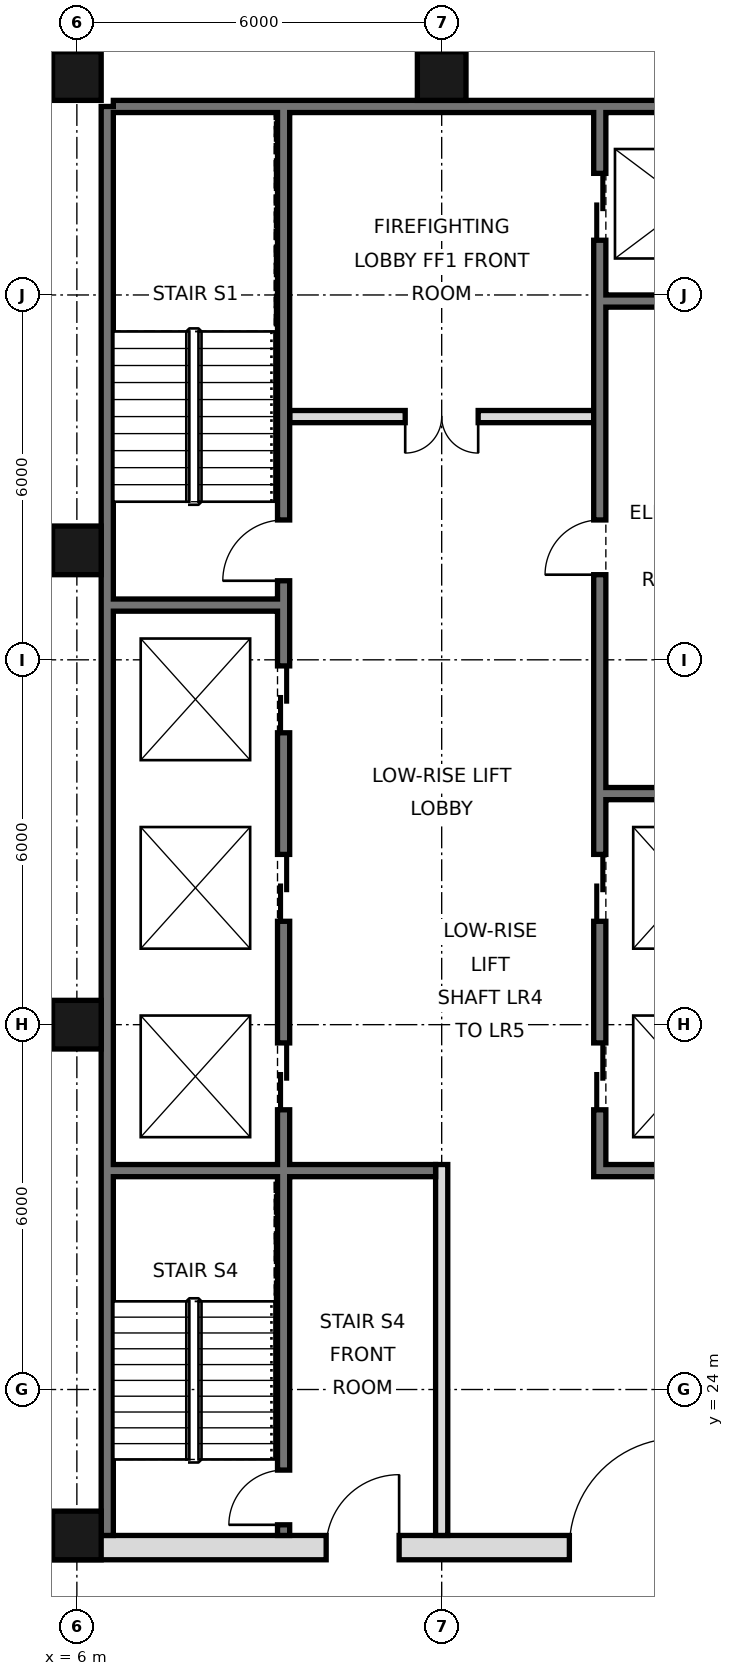
"""IFC4 building model, lengths in metres.
Left out: names, types, materials, properties, quantities, classifications, styles, units other than length and angle.
Written with IfcOpenShell. Run it as: python <this file> out.ifc"""

import sys

from ifc_helpers import new_model, si_unit, direction, frame, frame_2d, origin, origin_2d, place, context, subcontext, project, spatial, rectangle, hollow_rectangle, extrude, element, fill, save


model = new_model("IFC4")
c1 = context("Model", 3, precision=1e-05, world=origin(), true_north=direction((0.0, 1.0)))
c2 = subcontext(c1, "Body", "Model", "MODEL_VIEW")
j1 = project(units=[si_unit("LENGTHUNIT", "METRE"), si_unit("PLANEANGLEUNIT", "RADIAN")], contexts=[c1])
p1 = place(None, origin())
s1 = spatial("IfcSite", under=j1, at=p1, CompositionType="ELEMENT")
p2 = place(p1, origin())
s2 = spatial("IfcBuilding", under=s1, at=p2, CompositionType="ELEMENT")
p3 = place(p2, frame((0.0, 0.0, 151.0)))
s3 = spatial("IfcBuildingStorey", under=s2, at=p3, CompositionType="ELEMENT", Elevation=151.0)
for number, where, z_axis, x_axis in (
    (1, (6.0, 21.6, 0.0), (0.0, 0.0, 1.0), (1.0, 0.0, 0.0)),
    (2, (6.0, 30.0, 0.0), (0.0, 0.0, 1.0), (1.0, 0.0, 0.0)),
    (3, (6.0, 37.8, 0.0), (0.0, 0.0, 1.0), (1.0, 0.0, 0.0)),
    (4, (6.0, 45.6, 0.0), (0.0, 0.0, 1.0), (1.0, 0.0, 0.0)),
    (5, (12.0, 45.6, 0.0), (0.0, 0.0, 1.0), (1.0, 0.0, 0.0)),
):
    element("IfcColumn", number, at=place(p3, frame(where, z_axis=z_axis, x_axis=x_axis)), inside=s3, PredefinedType="COLUMN", context=c2, shape_type="SweptSolid", body=[
        extrude(hollow_rectangle(XDim=0.8, YDim=0.8, WallThickness=0.045, at=origin_2d()), origin(), (0.0, 0.0, 1.0), 3.6),
    ])
p4 = place(p3, frame((6.5, 21.6, 0.0), z_axis=(0.0, 0.0, 1.0), x_axis=(0.0, 1.0, 0.0)))
e6 = element("IfcWall", 6, at=p4, inside=s3, PredefinedType="SOLIDWALL", context=c2, shape_type="SweptSolid", body=[
    extrude(rectangle(XDim=23.5, YDim=0.2, at=frame_2d((11.75, 0.0))), origin(), (0.0, 0.0, 1.0), 3.42),
])
p5 = place(p3, frame((6.6, 45.1, 0.0), z_axis=(0.0, 0.0, 1.0), x_axis=(1.0, 0.0, 0.0)))
e7 = element("IfcWall", 7, at=p5, inside=s3, PredefinedType="SOLIDWALL", context=c2, shape_type="SweptSolid", body=[
    extrude(rectangle(XDim=34.8, YDim=0.2, at=frame_2d((17.4, 0.0))), origin(), (0.0, 0.0, 1.0), 3.42),
])
p6 = place(p3, frame((5.6, 21.4, 0.0), z_axis=(0.0, 0.0, 1.0), x_axis=(1.0, 0.0, 0.0)))
e8 = element("IfcWall", 8, at=p6, inside=s3, PredefinedType="SOLIDWALL", context=c2, shape_type="SweptSolid", body=[
    extrude(rectangle(XDim=36.8, YDim=0.4, at=frame_2d((18.4, 0.0))), origin(), (0.0, 0.0, 1.0), 3.42),
])
p7 = place(p6, frame((8.5, 0.0, 0.0)))
e9 = element("IfcOpeningElement", 9, at=p7, cuts=e8, PredefinedType="OPENING", context=c2, shape_type="SweptSolid", body=[
    extrude(rectangle(XDim=1.8, YDim=2.1, at=frame_2d((0.9, 1.05))), frame((0.0, 0.21, 0.0), z_axis=(0.0, -1.0, 0.0), x_axis=(1.0, 0.0, 0.0)), (0.0, 0.0, 1.0), 0.42),
])
p8 = place(p6, frame((17.5, 0.0, 0.0)))
e10 = element("IfcOpeningElement", 10, at=p8, cuts=e8, PredefinedType="OPENING", context=c2, shape_type="SweptSolid", body=[
    extrude(rectangle(XDim=1.8, YDim=2.1, at=frame_2d((0.9, 1.05))), frame((0.0, 0.21, 0.0), z_axis=(0.0, -1.0, 0.0), x_axis=(1.0, 0.0, 0.0)), (0.0, 0.0, 1.0), 0.42),
])
p9 = place(p6, frame((26.5, 0.0, 0.0)))
e11 = element("IfcOpeningElement", 11, at=p9, cuts=e8, PredefinedType="OPENING", context=c2, shape_type="SweptSolid", body=[
    extrude(rectangle(XDim=1.8, YDim=2.1, at=frame_2d((0.9, 1.05))), frame((0.0, 0.21, 0.0), z_axis=(0.0, -1.0, 0.0), x_axis=(1.0, 0.0, 0.0)), (0.0, 0.0, 1.0), 0.42),
])
p10 = place(p6, frame((4.5, 0.0, 0.0)))
e12 = element("IfcOpeningElement", 12, at=p10, cuts=e8, PredefinedType="OPENING", context=c2, shape_type="SweptSolid", body=[
    extrude(rectangle(XDim=1.2, YDim=2.1, at=frame_2d((0.6, 1.05))), frame((0.0, 0.21, 0.0), z_axis=(0.0, -1.0, 0.0), x_axis=(1.0, 0.0, 0.0)), (0.0, 0.0, 1.0), 0.42),
])
p11 = place(p6, frame((31.1, 0.0, 0.0)))
e13 = element("IfcOpeningElement", 13, at=p11, cuts=e8, PredefinedType="OPENING", context=c2, shape_type="SweptSolid", body=[
    extrude(rectangle(XDim=1.2, YDim=2.1, at=frame_2d((0.6, 1.05))), frame((0.0, 0.21, 0.0), z_axis=(0.0, -1.0, 0.0), x_axis=(1.0, 0.0, 0.0)), (0.0, 0.0, 1.0), 0.42),
])
p12 = place(p3, frame((12.0, 21.6, 0.0), z_axis=(0.0, 0.0, 1.0), x_axis=(0.0, 1.0, 0.0)))
e14 = element("IfcWall", 14, at=p12, inside=s3, PredefinedType="PARTITIONING", context=c2, shape_type="SweptSolid", body=[
    extrude(rectangle(XDim=6.1, YDim=0.2, at=frame_2d((3.05, 0.0))), origin(), (0.0, 0.0, 1.0), 3.42),
])
p13 = place(p3, frame((14.6, 27.5, 0.0), z_axis=(0.0, 0.0, 1.0), x_axis=(0.0, 1.0, 0.0)))
e15 = element("IfcWall", 15, at=p13, inside=s3, PredefinedType="SOLIDWALL", context=c2, shape_type="SweptSolid", body=[
    extrude(rectangle(XDim=17.5, YDim=0.2, at=frame_2d((8.75, 0.0))), origin(), (0.0, 0.0, 1.0), 3.42),
])
p14 = place(p13, frame((1.1, 0.0, 0.0)))
e16 = element("IfcOpeningElement", 16, at=p14, cuts=e15, PredefinedType="OPENING", context=c2, shape_type="SweptSolid", body=[
    extrude(rectangle(XDim=1.1, YDim=2.1, at=frame_2d((0.55, 1.05))), frame((0.0, 0.11, 0.0), z_axis=(0.0, -1.0, 0.0), x_axis=(1.0, 0.0, 0.0)), (0.0, 0.0, 1.0), 0.22),
])
p15 = place(p13, frame((4.2, 0.0, 0.0)))
e17 = element("IfcOpeningElement", 17, at=p15, cuts=e15, PredefinedType="OPENING", context=c2, shape_type="SweptSolid", body=[
    extrude(rectangle(XDim=1.1, YDim=2.1, at=frame_2d((0.55, 1.05))), frame((0.0, 0.11, 0.0), z_axis=(0.0, -1.0, 0.0), x_axis=(1.0, 0.0, 0.0)), (0.0, 0.0, 1.0), 0.22),
])
p16 = place(p13, frame((15.4, 0.0, 0.0)))
e18 = element("IfcOpeningElement", 18, at=p16, cuts=e15, PredefinedType="OPENING", context=c2, shape_type="SweptSolid", body=[
    extrude(rectangle(XDim=1.1, YDim=2.1, at=frame_2d((0.55, 1.05))), frame((0.0, 0.11, 0.0), z_axis=(0.0, -1.0, 0.0), x_axis=(1.0, 0.0, 0.0)), (0.0, 0.0, 1.0), 0.22),
])
p17 = place(p13, frame((9.9, 0.0, 0.0)))
e19 = element("IfcOpeningElement", 19, at=p17, cuts=e15, PredefinedType="OPENING", context=c2, shape_type="SweptSolid", body=[
    extrude(rectangle(XDim=0.9, YDim=2.1, at=frame_2d((0.45, 1.05))), frame((0.0, 0.11, 0.0), z_axis=(0.0, -1.0, 0.0), x_axis=(1.0, 0.0, 0.0)), (0.0, 0.0, 1.0), 0.22),
])
p18 = place(p3, frame((9.4, 21.6, 0.0), z_axis=(0.0, 0.0, 1.0), x_axis=(0.0, 1.0, 0.0)))
e20 = element("IfcWall", 20, at=p18, inside=s3, PredefinedType="SOLIDWALL", context=c2, shape_type="SweptSolid", body=[
    extrude(rectangle(XDim=23.4, YDim=0.2, at=frame_2d((11.7, 0.0))), origin(), (0.0, 0.0, 1.0), 3.42),
])
p19 = place(p18, frame((7.0, 0.0, 0.0)))
e21 = element("IfcOpeningElement", 21, at=p19, cuts=e20, PredefinedType="OPENING", context=c2, shape_type="SweptSolid", body=[
    extrude(rectangle(XDim=1.1, YDim=2.1, at=frame_2d((0.55, 1.05))), frame((0.0, 0.11, 0.0), z_axis=(0.0, -1.0, 0.0), x_axis=(1.0, 0.0, 0.0)), (0.0, 0.0, 1.0), 0.22),
])
p20 = place(p18, frame((10.1, 0.0, 0.0)))
e22 = element("IfcOpeningElement", 22, at=p20, cuts=e20, PredefinedType="OPENING", context=c2, shape_type="SweptSolid", body=[
    extrude(rectangle(XDim=1.1, YDim=2.1, at=frame_2d((0.55, 1.05))), frame((0.0, 0.11, 0.0), z_axis=(0.0, -1.0, 0.0), x_axis=(1.0, 0.0, 0.0)), (0.0, 0.0, 1.0), 0.22),
])
p21 = place(p18, frame((13.2, 0.0, 0.0)))
e23 = element("IfcOpeningElement", 23, at=p21, cuts=e20, PredefinedType="OPENING", context=c2, shape_type="SweptSolid", body=[
    extrude(rectangle(XDim=1.1, YDim=2.1, at=frame_2d((0.55, 1.05))), frame((0.0, 0.11, 0.0), z_axis=(0.0, -1.0, 0.0), x_axis=(1.0, 0.0, 0.0)), (0.0, 0.0, 1.0), 0.22),
])
p22 = place(p18, frame((15.7, 0.0, 0.0)))
e24 = element("IfcOpeningElement", 24, at=p22, cuts=e20, PredefinedType="OPENING", context=c2, shape_type="SweptSolid", body=[
    extrude(rectangle(XDim=1.0, YDim=2.1, at=frame_2d((0.5, 1.05))), frame((0.0, 0.11, 0.0), z_axis=(0.0, -1.0, 0.0), x_axis=(1.0, 0.0, 0.0)), (0.0, 0.0, 1.0), 0.22),
])
p23 = place(p18, frame((0.175, 0.0, 0.0)))
e25 = element("IfcOpeningElement", 25, at=p23, cuts=e20, PredefinedType="OPENING", context=c2, shape_type="SweptSolid", body=[
    extrude(rectangle(XDim=0.9, YDim=2.1, at=frame_2d((0.45, 1.05))), frame((0.0, 0.11, 0.0), z_axis=(0.0, -1.0, 0.0), x_axis=(1.0, 0.0, 0.0)), (0.0, 0.0, 1.0), 0.22),
])
p24 = place(p3, frame((14.7, 27.6, 0.0), z_axis=(0.0, 0.0, 1.0), x_axis=(1.0, 0.0, 0.0)))
e26 = element("IfcWall", 26, at=p24, inside=s3, PredefinedType="SOLIDWALL", context=c2, shape_type="SweptSolid", body=[
    extrude(rectangle(XDim=2.7, YDim=0.2, at=frame_2d((1.35, 0.0))), origin(), (0.0, 0.0, 1.0), 3.42),
])
p25 = place(p3, frame((6.6, 27.6, 0.0), z_axis=(0.0, 0.0, 1.0), x_axis=(1.0, 0.0, 0.0)))
e27 = element("IfcWall", 27, at=p25, inside=s3, PredefinedType="SOLIDWALL", context=c2, shape_type="SweptSolid", body=[
    extrude(rectangle(XDim=5.3, YDim=0.2, at=frame_2d((2.65, 0.0))), origin(), (0.0, 0.0, 1.0), 3.42),
])
for number, where, z_axis, x_axis in (
    (28, (14.7, 33.8, 0.0), (0.0, 0.0, 1.0), (1.0, 0.0, 0.0)),
    (29, (6.6, 36.9, 0.0), (0.0, 0.0, 1.0), (1.0, 0.0, 0.0)),
):
    element("IfcWall", number, at=place(p3, frame(where, z_axis=z_axis, x_axis=x_axis)), inside=s3, PredefinedType="SOLIDWALL", context=c2, shape_type="SweptSolid", body=[
        extrude(rectangle(XDim=2.7, YDim=0.2, at=frame_2d((1.35, 0.0))), origin(), (0.0, 0.0, 1.0), 3.42),
    ])
p26 = place(p3, frame((9.5, 40.0, 0.0), z_axis=(0.0, 0.0, 1.0), x_axis=(1.0, 0.0, 0.0)))
e30 = element("IfcWall", 30, at=p26, inside=s3, PredefinedType="PARTITIONING", context=c2, shape_type="SweptSolid", body=[
    extrude(rectangle(XDim=5.0, YDim=0.2, at=frame_2d((2.5, 0.0))), origin(), (0.0, 0.0, 1.0), 3.42),
])
p27 = place(p26, frame((1.9, 0.0, 0.0)))
e31 = element("IfcOpeningElement", 31, at=p27, cuts=e30, PredefinedType="OPENING", context=c2, shape_type="SweptSolid", body=[
    extrude(rectangle(XDim=1.2, YDim=2.1, at=frame_2d((0.6, 1.05))), frame((0.0, 0.11, 0.0), z_axis=(0.0, -1.0, 0.0), x_axis=(1.0, 0.0, 0.0)), (0.0, 0.0, 1.0), 0.22),
])
p28 = place(p3, frame((14.7, 41.9, 0.0), z_axis=(0.0, 0.0, 1.0), x_axis=(1.0, 0.0, 0.0)))
e32 = element("IfcWall", 32, at=p28, inside=s3, PredefinedType="SOLIDWALL", context=c2, shape_type="SweptSolid", body=[
    extrude(rectangle(XDim=2.7, YDim=0.2, at=frame_2d((1.35, 0.0))), origin(), (0.0, 0.0, 1.0), 3.42),
])
p29 = place(p7, frame((1.8, 0.0, 0.0), z_axis=(0.0, 0.0, 1.0), x_axis=(-1.0, 0.0, 0.0)))
e33 = element("IfcDoor", 33, at=p29, inside=s3, OperationType="SINGLE_SWING_LEFT", PredefinedType="DOOR", context=c2, shape_type="SweptSolid", body=[
    extrude(rectangle(XDim=1.8, YDim=2.1, at=frame_2d((0.9, 1.05))), frame((0.0, 0.025, 0.0), z_axis=(0.0, -1.0, 0.0), x_axis=(1.0, 0.0, 0.0)), (0.0, 0.0, 1.0), 0.05),
])
fill(e9, e33)
p30 = place(p10, frame((1.2, 0.0, 0.0), z_axis=(0.0, 0.0, 1.0), x_axis=(-1.0, 0.0, 0.0)))
e34 = element("IfcDoor", 34, at=p30, inside=s3, OperationType="SINGLE_SWING_LEFT", PredefinedType="DOOR", context=c2, shape_type="SweptSolid", body=[
    extrude(rectangle(XDim=1.2, YDim=2.1, at=frame_2d((0.6, 1.05))), frame((0.0, 0.025, 0.0), z_axis=(0.0, -1.0, 0.0), x_axis=(1.0, 0.0, 0.0)), (0.0, 0.0, 1.0), 0.05),
])
fill(e12, e34)
p31 = place(p27, frame((1.2, 0.0, 0.0), z_axis=(0.0, 0.0, 1.0), x_axis=(-1.0, 0.0, 0.0)))
e35 = element("IfcDoor", 35, at=p31, inside=s3, OperationType="DOUBLE_DOOR_SINGLE_SWING", PredefinedType="DOOR", context=c2, shape_type="SweptSolid", body=[
    extrude(rectangle(XDim=1.2, YDim=2.1, at=frame_2d((0.6, 1.05))), frame((0.0, 0.025, 0.0), z_axis=(0.0, -1.0, 0.0), x_axis=(1.0, 0.0, 0.0)), (0.0, 0.0, 1.0), 0.05),
])
fill(e31, e35)
p32 = place(p14, origin())
e36 = element("IfcDoor", 36, at=p32, inside=s3, OperationType="DOUBLE_DOOR_SLIDING", PredefinedType="DOOR", context=c2, shape_type="SweptSolid", body=[
    extrude(rectangle(XDim=1.1, YDim=2.1, at=frame_2d((0.55, 1.05))), frame((0.0, 0.025, 0.0), z_axis=(0.0, -1.0, 0.0), x_axis=(1.0, 0.0, 0.0)), (0.0, 0.0, 1.0), 0.05),
])
fill(e16, e36)
p33 = place(p15, origin())
e37 = element("IfcDoor", 37, at=p33, inside=s3, OperationType="DOUBLE_DOOR_SLIDING", PredefinedType="DOOR", context=c2, shape_type="SweptSolid", body=[
    extrude(rectangle(XDim=1.1, YDim=2.1, at=frame_2d((0.55, 1.05))), frame((0.0, 0.025, 0.0), z_axis=(0.0, -1.0, 0.0), x_axis=(1.0, 0.0, 0.0)), (0.0, 0.0, 1.0), 0.05),
])
fill(e17, e37)
p34 = place(p16, origin())
e38 = element("IfcDoor", 38, at=p34, inside=s3, OperationType="DOUBLE_DOOR_SLIDING", PredefinedType="DOOR", context=c2, shape_type="SweptSolid", body=[
    extrude(rectangle(XDim=1.1, YDim=2.1, at=frame_2d((0.55, 1.05))), frame((0.0, 0.025, 0.0), z_axis=(0.0, -1.0, 0.0), x_axis=(1.0, 0.0, 0.0)), (0.0, 0.0, 1.0), 0.05),
])
fill(e18, e38)
p35 = place(p19, origin())
e39 = element("IfcDoor", 39, at=p35, inside=s3, OperationType="DOUBLE_DOOR_SLIDING", PredefinedType="DOOR", context=c2, shape_type="SweptSolid", body=[
    extrude(rectangle(XDim=1.1, YDim=2.1, at=frame_2d((0.55, 1.05))), frame((0.0, 0.025, 0.0), z_axis=(0.0, -1.0, 0.0), x_axis=(1.0, 0.0, 0.0)), (0.0, 0.0, 1.0), 0.05),
])
fill(e21, e39)
p36 = place(p20, origin())
e40 = element("IfcDoor", 40, at=p36, inside=s3, OperationType="DOUBLE_DOOR_SLIDING", PredefinedType="DOOR", context=c2, shape_type="SweptSolid", body=[
    extrude(rectangle(XDim=1.1, YDim=2.1, at=frame_2d((0.55, 1.05))), frame((0.0, 0.025, 0.0), z_axis=(0.0, -1.0, 0.0), x_axis=(1.0, 0.0, 0.0)), (0.0, 0.0, 1.0), 0.05),
])
fill(e22, e40)
p37 = place(p21, origin())
e41 = element("IfcDoor", 41, at=p37, inside=s3, OperationType="DOUBLE_DOOR_SLIDING", PredefinedType="DOOR", context=c2, shape_type="SweptSolid", body=[
    extrude(rectangle(XDim=1.1, YDim=2.1, at=frame_2d((0.55, 1.05))), frame((0.0, 0.025, 0.0), z_axis=(0.0, -1.0, 0.0), x_axis=(1.0, 0.0, 0.0)), (0.0, 0.0, 1.0), 0.05),
])
fill(e23, e41)
p38 = place(p22, origin())
e42 = element("IfcDoor", 42, at=p38, inside=s3, OperationType="SINGLE_SWING_LEFT", PredefinedType="DOOR", context=c2, shape_type="SweptSolid", body=[
    extrude(rectangle(XDim=1.0, YDim=2.1, at=frame_2d((0.5, 1.05))), frame((0.0, 0.025, 0.0), z_axis=(0.0, -1.0, 0.0), x_axis=(1.0, 0.0, 0.0)), (0.0, 0.0, 1.0), 0.05),
])
fill(e24, e42)
p39 = place(p23, origin())
e43 = element("IfcDoor", 43, at=p39, inside=s3, OperationType="SINGLE_SWING_LEFT", PredefinedType="DOOR", context=c2, shape_type="SweptSolid", body=[
    extrude(rectangle(XDim=0.9, YDim=2.1, at=frame_2d((0.45, 1.05))), frame((0.0, 0.025, 0.0), z_axis=(0.0, -1.0, 0.0), x_axis=(1.0, 0.0, 0.0)), (0.0, 0.0, 1.0), 0.05),
])
fill(e25, e43)
p40 = place(p17, origin())
e44 = element("IfcDoor", 44, at=p40, inside=s3, OperationType="SINGLE_SWING_LEFT", PredefinedType="DOOR", context=c2, shape_type="SweptSolid", body=[
    extrude(rectangle(XDim=0.9, YDim=2.1, at=frame_2d((0.45, 1.05))), frame((0.0, 0.025, 0.0), z_axis=(0.0, -1.0, 0.0), x_axis=(1.0, 0.0, 0.0)), (0.0, 0.0, 1.0), 0.05),
])
fill(e19, e44)
save(model, sys.argv[1])
